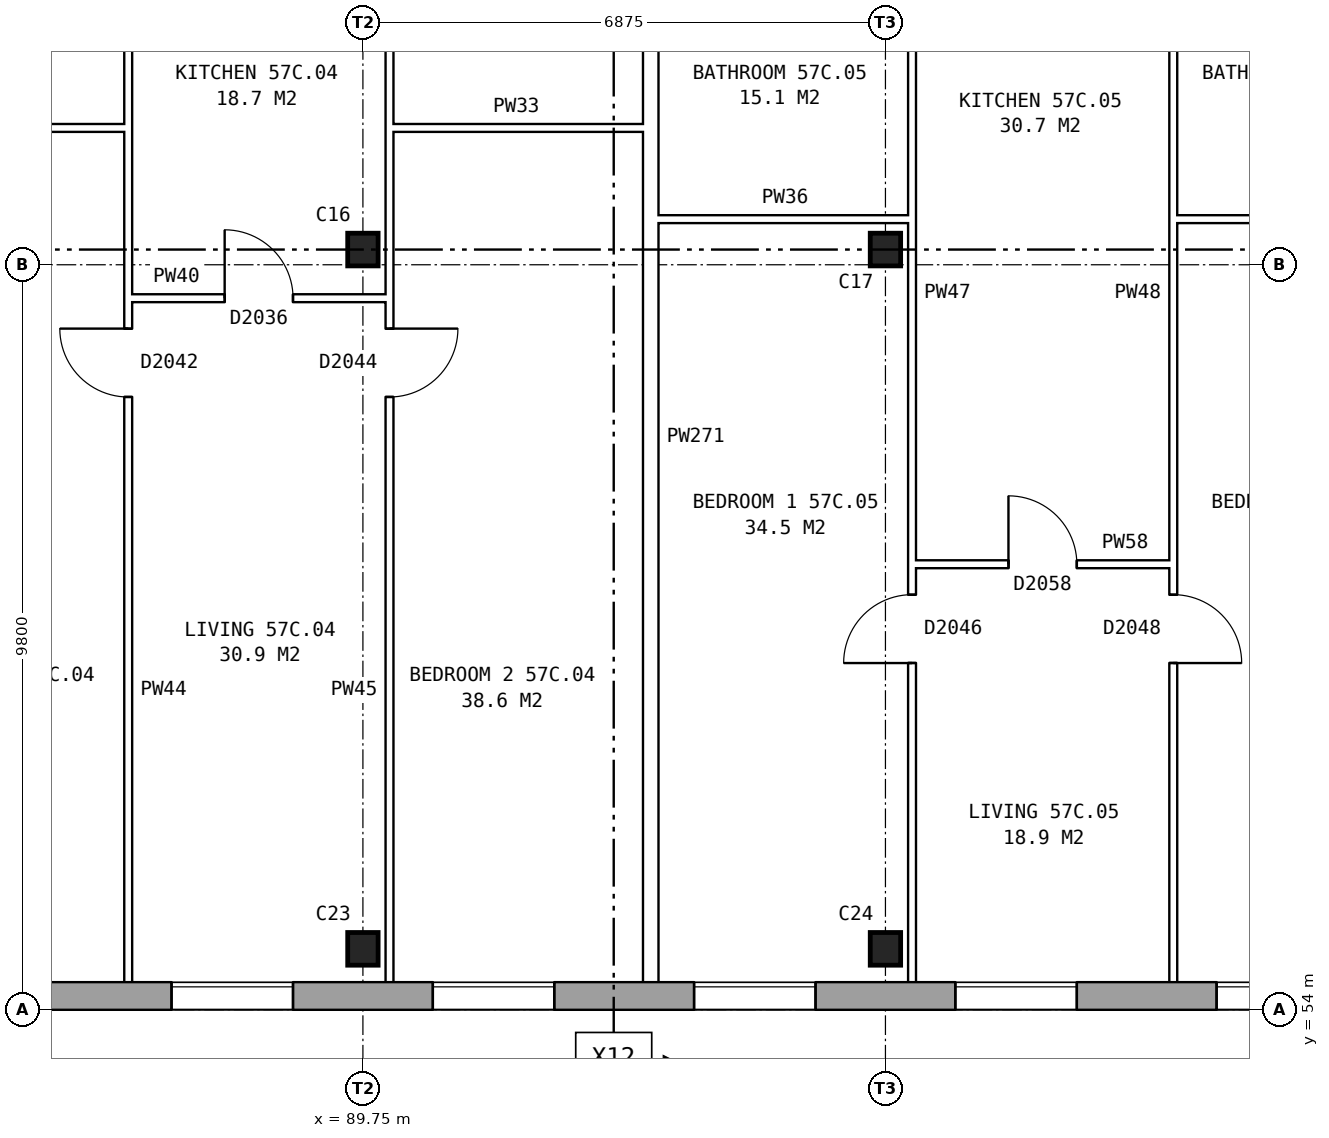
"""IFC4 building model, lengths in metres.
Left out: names, types, materials, properties, quantities, classifications, styles, units other than length and angle.
Written with IfcOpenShell. Run it as: python <this file> out.ifc"""

import sys

from ifc_helpers import new_model, si_unit, direction, frame, frame_2d, origin, origin_2d, place, context, subcontext, project, spatial, rectangle, i_section, extrude, element, fill, save


model = new_model("IFC4")
c1 = context("Model", 3, precision=1e-05, world=origin(), true_north=direction((0.0, 1.0)))
c2 = subcontext(c1, "Body", "Model", "MODEL_VIEW")
j1 = project(units=[si_unit("LENGTHUNIT", "METRE"), si_unit("PLANEANGLEUNIT", "RADIAN")], contexts=[c1])
p1 = place(None, origin())
s1 = spatial("IfcSite", under=j1, at=p1, CompositionType="ELEMENT")
p2 = place(p1, origin())
s2 = spatial("IfcBuilding", under=s1, at=p2, CompositionType="ELEMENT")
p3 = place(p2, frame((0.0, 0.0, 202.8)))
s3 = spatial("IfcBuildingStorey", under=s2, at=p3, CompositionType="ELEMENT", Elevation=202.8)
for number, where, z_axis, x_axis in (
    (1, (89.75, 54.8, 0.0), (0.0, 0.0, 1.0), (1.0, 0.0, 0.0)),
    (2, (96.625, 54.8, 0.0), (0.0, 0.0, 1.0), (1.0, 0.0, 0.0)),
    (3, (89.75, 64.0, 0.0), (0.0, 0.0, 1.0), (1.0, 0.0, 0.0)),
    (4, (96.625, 64.0, 0.0), (0.0, 0.0, 1.0), (1.0, 0.0, 0.0)),
):
    element("IfcColumn", number, at=place(p3, frame(where, z_axis=z_axis, x_axis=x_axis)), inside=s3, PredefinedType="COLUMN", context=c2, shape_type="SweptSolid", body=[
        extrude(i_section(OverallWidth=0.4, OverallDepth=0.43, WebThickness=0.04, FlangeThickness=0.04, at=origin_2d()), origin(), (0.0, 0.0, 1.0), 2.85),
    ])
p4 = place(p3, frame((75.95, 54.18, 0.0), z_axis=(0.0, 0.0, 1.0), x_axis=(1.0, 0.0, 0.0)))
e5 = element("IfcWall", 5, at=p4, inside=s3, PredefinedType="STANDARD", context=c2, shape_type="SweptSolid", body=[
    extrude(rectangle(XDim=55.1, YDim=0.36, at=frame_2d((27.55, 0.0))), origin(), (0.0, 0.0, 1.0), 2.85),
])
p5 = place(p4, frame((0.969, 0.0, 0.8)))
e6 = element("IfcOpeningElement", 6, at=p5, cuts=e5, PredefinedType="OPENING", context=c2, shape_type="SweptSolid", body=[
    extrude(rectangle(XDim=1.6, YDim=1.8, at=frame_2d((0.8, 0.9))), frame((0.0, 0.19, 0.0), z_axis=(0.0, -1.0, 0.0), x_axis=(1.0, 0.0, 0.0)), (0.0, 0.0, 1.0), 0.38),
])
p6 = place(p4, frame((4.406, 0.0, 0.8)))
e7 = element("IfcOpeningElement", 7, at=p6, cuts=e5, PredefinedType="OPENING", context=c2, shape_type="SweptSolid", body=[
    extrude(rectangle(XDim=1.6, YDim=1.8, at=frame_2d((0.8, 0.9))), frame((0.0, 0.19, 0.0), z_axis=(0.0, -1.0, 0.0), x_axis=(1.0, 0.0, 0.0)), (0.0, 0.0, 1.0), 0.38),
])
p7 = place(p4, frame((7.844, 0.0, 0.8)))
e8 = element("IfcOpeningElement", 8, at=p7, cuts=e5, PredefinedType="OPENING", context=c2, shape_type="SweptSolid", body=[
    extrude(rectangle(XDim=1.6, YDim=1.8, at=frame_2d((0.8, 0.9))), frame((0.0, 0.19, 0.0), z_axis=(0.0, -1.0, 0.0), x_axis=(1.0, 0.0, 0.0)), (0.0, 0.0, 1.0), 0.38),
])
p8 = place(p4, frame((11.281, 0.0, 0.8)))
e9 = element("IfcOpeningElement", 9, at=p8, cuts=e5, PredefinedType="OPENING", context=c2, shape_type="SweptSolid", body=[
    extrude(rectangle(XDim=1.6, YDim=1.8, at=frame_2d((0.8, 0.9))), frame((0.0, 0.19, 0.0), z_axis=(0.0, -1.0, 0.0), x_axis=(1.0, 0.0, 0.0)), (0.0, 0.0, 1.0), 0.38),
])
p9 = place(p4, frame((14.719, 0.0, 0.8)))
e10 = element("IfcOpeningElement", 10, at=p9, cuts=e5, PredefinedType="OPENING", context=c2, shape_type="SweptSolid", body=[
    extrude(rectangle(XDim=1.6, YDim=1.8, at=frame_2d((0.8, 0.9))), frame((0.0, 0.19, 0.0), z_axis=(0.0, -1.0, 0.0), x_axis=(1.0, 0.0, 0.0)), (0.0, 0.0, 1.0), 0.38),
])
p10 = place(p4, frame((18.156, 0.0, 0.8)))
e11 = element("IfcOpeningElement", 11, at=p10, cuts=e5, PredefinedType="OPENING", context=c2, shape_type="SweptSolid", body=[
    extrude(rectangle(XDim=1.6, YDim=1.8, at=frame_2d((0.8, 0.9))), frame((0.0, 0.19, 0.0), z_axis=(0.0, -1.0, 0.0), x_axis=(1.0, 0.0, 0.0)), (0.0, 0.0, 1.0), 0.38),
])
p11 = place(p4, frame((21.594, 0.0, 0.8)))
e12 = element("IfcOpeningElement", 12, at=p11, cuts=e5, PredefinedType="OPENING", context=c2, shape_type="SweptSolid", body=[
    extrude(rectangle(XDim=1.6, YDim=1.8, at=frame_2d((0.8, 0.9))), frame((0.0, 0.19, 0.0), z_axis=(0.0, -1.0, 0.0), x_axis=(1.0, 0.0, 0.0)), (0.0, 0.0, 1.0), 0.38),
])
p12 = place(p4, frame((25.031, 0.0, 0.8)))
e13 = element("IfcOpeningElement", 13, at=p12, cuts=e5, PredefinedType="OPENING", context=c2, shape_type="SweptSolid", body=[
    extrude(rectangle(XDim=1.6, YDim=1.8, at=frame_2d((0.8, 0.9))), frame((0.0, 0.19, 0.0), z_axis=(0.0, -1.0, 0.0), x_axis=(1.0, 0.0, 0.0)), (0.0, 0.0, 1.0), 0.38),
])
p13 = place(p4, frame((28.469, 0.0, 0.8)))
e14 = element("IfcOpeningElement", 14, at=p13, cuts=e5, PredefinedType="OPENING", context=c2, shape_type="SweptSolid", body=[
    extrude(rectangle(XDim=1.6, YDim=1.8, at=frame_2d((0.8, 0.9))), frame((0.0, 0.19, 0.0), z_axis=(0.0, -1.0, 0.0), x_axis=(1.0, 0.0, 0.0)), (0.0, 0.0, 1.0), 0.38),
])
p14 = place(p4, frame((31.906, 0.0, 0.8)))
e15 = element("IfcOpeningElement", 15, at=p14, cuts=e5, PredefinedType="OPENING", context=c2, shape_type="SweptSolid", body=[
    extrude(rectangle(XDim=1.6, YDim=1.8, at=frame_2d((0.8, 0.9))), frame((0.0, 0.19, 0.0), z_axis=(0.0, -1.0, 0.0), x_axis=(1.0, 0.0, 0.0)), (0.0, 0.0, 1.0), 0.38),
])
p15 = place(p4, frame((35.344, 0.0, 0.8)))
e16 = element("IfcOpeningElement", 16, at=p15, cuts=e5, PredefinedType="OPENING", context=c2, shape_type="SweptSolid", body=[
    extrude(rectangle(XDim=1.6, YDim=1.8, at=frame_2d((0.8, 0.9))), frame((0.0, 0.19, 0.0), z_axis=(0.0, -1.0, 0.0), x_axis=(1.0, 0.0, 0.0)), (0.0, 0.0, 1.0), 0.38),
])
p16 = place(p4, frame((38.781, 0.0, 0.8)))
e17 = element("IfcOpeningElement", 17, at=p16, cuts=e5, PredefinedType="OPENING", context=c2, shape_type="SweptSolid", body=[
    extrude(rectangle(XDim=1.6, YDim=1.8, at=frame_2d((0.8, 0.9))), frame((0.0, 0.19, 0.0), z_axis=(0.0, -1.0, 0.0), x_axis=(1.0, 0.0, 0.0)), (0.0, 0.0, 1.0), 0.38),
])
p17 = place(p4, frame((42.219, 0.0, 0.8)))
e18 = element("IfcOpeningElement", 18, at=p17, cuts=e5, PredefinedType="OPENING", context=c2, shape_type="SweptSolid", body=[
    extrude(rectangle(XDim=1.6, YDim=1.8, at=frame_2d((0.8, 0.9))), frame((0.0, 0.19, 0.0), z_axis=(0.0, -1.0, 0.0), x_axis=(1.0, 0.0, 0.0)), (0.0, 0.0, 1.0), 0.38),
])
p18 = place(p4, frame((45.656, 0.0, 0.8)))
e19 = element("IfcOpeningElement", 19, at=p18, cuts=e5, PredefinedType="OPENING", context=c2, shape_type="SweptSolid", body=[
    extrude(rectangle(XDim=1.6, YDim=1.8, at=frame_2d((0.8, 0.9))), frame((0.0, 0.19, 0.0), z_axis=(0.0, -1.0, 0.0), x_axis=(1.0, 0.0, 0.0)), (0.0, 0.0, 1.0), 0.38),
])
p19 = place(p4, frame((49.094, 0.0, 0.8)))
e20 = element("IfcOpeningElement", 20, at=p19, cuts=e5, PredefinedType="OPENING", context=c2, shape_type="SweptSolid", body=[
    extrude(rectangle(XDim=1.6, YDim=1.8, at=frame_2d((0.8, 0.9))), frame((0.0, 0.19, 0.0), z_axis=(0.0, -1.0, 0.0), x_axis=(1.0, 0.0, 0.0)), (0.0, 0.0, 1.0), 0.38),
])
p20 = place(p4, frame((52.531, 0.0, 0.8)))
e21 = element("IfcOpeningElement", 21, at=p20, cuts=e5, PredefinedType="OPENING", context=c2, shape_type="SweptSolid", body=[
    extrude(rectangle(XDim=1.6, YDim=1.8, at=frame_2d((0.8, 0.9))), frame((0.0, 0.19, 0.0), z_axis=(0.0, -1.0, 0.0), x_axis=(1.0, 0.0, 0.0)), (0.0, 0.0, 1.0), 0.38),
])
p21 = place(p3, frame((96.975, 59.86, 0.0), z_axis=(0.0, 0.0, 1.0), x_axis=(1.0, 0.0, 0.0)))
e22 = element("IfcWall", 22, at=p21, inside=s3, PredefinedType="PARTITIONING", context=c2, shape_type="SweptSolid", body=[
    extrude(rectangle(XDim=3.437, YDim=0.1, at=frame_2d((1.719, 0.0))), origin(), (0.0, 0.0, 1.0), 2.85),
])
p22 = place(p21, frame((1.269, 0.0, 0.0)))
e23 = element("IfcOpeningElement", 23, at=p22, cuts=e22, PredefinedType="OPENING", context=c2, shape_type="SweptSolid", body=[
    extrude(rectangle(XDim=0.9, YDim=2.1, at=frame_2d((0.45, 1.05))), frame((0.0, 0.06, 0.0), z_axis=(0.0, -1.0, 0.0), x_axis=(1.0, 0.0, 0.0)), (0.0, 0.0, 1.0), 0.12),
])
p23 = place(p3, frame((86.662, 63.36, 0.0), z_axis=(0.0, 0.0, 1.0), x_axis=(1.0, 0.0, 0.0)))
e24 = element("IfcWall", 24, at=p23, inside=s3, PredefinedType="PARTITIONING", context=c2, shape_type="SweptSolid", body=[
    extrude(rectangle(XDim=3.438, YDim=0.1, at=frame_2d((1.719, 0.0))), origin(), (0.0, 0.0, 1.0), 2.85),
])
p24 = place(p23, frame((1.269, 0.0, 0.0)))
e25 = element("IfcOpeningElement", 25, at=p24, cuts=e24, PredefinedType="OPENING", context=c2, shape_type="SweptSolid", body=[
    extrude(rectangle(XDim=0.9, YDim=2.1, at=frame_2d((0.45, 1.05))), frame((0.0, 0.06, 0.0), z_axis=(0.0, -1.0, 0.0), x_axis=(1.0, 0.0, 0.0)), (0.0, 0.0, 1.0), 0.12),
])
p25 = place(p3, frame((93.637, 64.4, 0.0), z_axis=(0.0, 0.0, 1.0), x_axis=(1.0, 0.0, 0.0)))
e26 = element("IfcWall", 26, at=p25, inside=s3, PredefinedType="PARTITIONING", context=c2, shape_type="SweptSolid", body=[
    extrude(rectangle(XDim=3.338, YDim=0.1, at=frame_2d((1.669, 0.0))), origin(), (0.0, 0.0, 1.0), 2.85),
])
p26 = place(p3, frame((100.412, 64.4, 0.0), z_axis=(0.0, 0.0, 1.0), x_axis=(1.0, 0.0, 0.0)))
e27 = element("IfcWall", 27, at=p26, inside=s3, PredefinedType="PARTITIONING", context=c2, shape_type="SweptSolid", body=[
    extrude(rectangle(XDim=6.875, YDim=0.1, at=frame_2d((3.438, 0.0))), origin(), (0.0, 0.0, 1.0), 2.85),
])
p27 = place(p3, frame((83.325, 65.6, 0.0), z_axis=(0.0, 0.0, 1.0), x_axis=(1.0, 0.0, 0.0)))
e28 = element("IfcWall", 28, at=p27, inside=s3, PredefinedType="PARTITIONING", context=c2, shape_type="SweptSolid", body=[
    extrude(rectangle(XDim=3.337, YDim=0.1, at=frame_2d((1.668, 0.0))), origin(), (0.0, 0.0, 1.0), 2.85),
])
p28 = place(p3, frame((90.1, 65.6, 0.0), z_axis=(0.0, 0.0, 1.0), x_axis=(1.0, 0.0, 0.0)))
e29 = element("IfcWall", 29, at=p28, inside=s3, PredefinedType="PARTITIONING", context=c2, shape_type="SweptSolid", body=[
    extrude(rectangle(XDim=3.337, YDim=0.1, at=frame_2d((1.668, 0.0))), origin(), (0.0, 0.0, 1.0), 2.85),
])
p29 = place(p3, frame((86.662, 54.36, 0.0), z_axis=(0.0, 0.0, 1.0), x_axis=(0.0, 1.0, 0.0)))
e30 = element("IfcWall", 30, at=p29, inside=s3, PredefinedType="PARTITIONING", context=c2, shape_type="SweptSolid", body=[
    extrude(rectangle(XDim=14.34, YDim=0.1, at=frame_2d((7.17, 0.0))), origin(), (0.0, 0.0, 1.0), 2.85),
])
p30 = place(p29, frame((7.7, 0.0, 0.0)))
e31 = element("IfcOpeningElement", 31, at=p30, cuts=e30, PredefinedType="OPENING", context=c2, shape_type="SweptSolid", body=[
    extrude(rectangle(XDim=0.9, YDim=2.1, at=frame_2d((0.45, 1.05))), frame((0.0, 0.06, 0.0), z_axis=(0.0, -1.0, 0.0), x_axis=(1.0, 0.0, 0.0)), (0.0, 0.0, 1.0), 0.12),
])
p31 = place(p29, frame((13.04, 0.0, 0.0)))
e32 = element("IfcOpeningElement", 32, at=p31, cuts=e30, PredefinedType="OPENING", context=c2, shape_type="SweptSolid", body=[
    extrude(rectangle(XDim=0.9, YDim=2.1, at=frame_2d((0.45, 1.05))), frame((0.0, 0.06, 0.0), z_axis=(0.0, -1.0, 0.0), x_axis=(1.0, 0.0, 0.0)), (0.0, 0.0, 1.0), 0.12),
])
p32 = place(p3, frame((90.1, 54.36, 0.0), z_axis=(0.0, 0.0, 1.0), x_axis=(0.0, 1.0, 0.0)))
e33 = element("IfcWall", 33, at=p32, inside=s3, PredefinedType="PARTITIONING", context=c2, shape_type="SweptSolid", body=[
    extrude(rectangle(XDim=14.34, YDim=0.1, at=frame_2d((7.17, 0.0))), origin(), (0.0, 0.0, 1.0), 2.85),
])
p33 = place(p32, frame((7.7, 0.0, 0.0)))
e34 = element("IfcOpeningElement", 34, at=p33, cuts=e33, PredefinedType="OPENING", context=c2, shape_type="SweptSolid", body=[
    extrude(rectangle(XDim=0.9, YDim=2.1, at=frame_2d((0.45, 1.05))), frame((0.0, 0.06, 0.0), z_axis=(0.0, -1.0, 0.0), x_axis=(1.0, 0.0, 0.0)), (0.0, 0.0, 1.0), 0.12),
])
p34 = place(p32, frame((13.04, 0.0, 0.0)))
e35 = element("IfcOpeningElement", 35, at=p34, cuts=e33, PredefinedType="OPENING", context=c2, shape_type="SweptSolid", body=[
    extrude(rectangle(XDim=0.9, YDim=2.1, at=frame_2d((0.45, 1.05))), frame((0.0, 0.06, 0.0), z_axis=(0.0, -1.0, 0.0), x_axis=(1.0, 0.0, 0.0)), (0.0, 0.0, 1.0), 0.12),
])
p35 = place(p3, frame((93.537, 54.36, 0.0), z_axis=(0.0, 0.0, 1.0), x_axis=(0.0, 1.0, 0.0)))
e36 = element("IfcWall", 36, at=p35, inside=s3, PredefinedType="PARTITIONING", context=c2, shape_type="SweptSolid", body=[
    extrude(rectangle(XDim=14.34, YDim=0.2, at=frame_2d((7.17, 0.0))), origin(), (0.0, 0.0, 1.0), 2.85),
])
p36 = place(p3, frame((96.975, 54.36, 0.0), z_axis=(0.0, 0.0, 1.0), x_axis=(0.0, 1.0, 0.0)))
e37 = element("IfcWall", 37, at=p36, inside=s3, PredefinedType="PARTITIONING", context=c2, shape_type="SweptSolid", body=[
    extrude(rectangle(XDim=14.34, YDim=0.1, at=frame_2d((7.17, 0.0))), origin(), (0.0, 0.0, 1.0), 2.85),
])
p37 = place(p36, frame((4.2, 0.0, 0.0)))
e38 = element("IfcOpeningElement", 38, at=p37, cuts=e37, PredefinedType="OPENING", context=c2, shape_type="SweptSolid", body=[
    extrude(rectangle(XDim=0.9, YDim=2.1, at=frame_2d((0.45, 1.05))), frame((0.0, 0.06, 0.0), z_axis=(0.0, -1.0, 0.0), x_axis=(1.0, 0.0, 0.0)), (0.0, 0.0, 1.0), 0.12),
])
p38 = place(p36, frame((13.04, 0.0, 0.0)))
e39 = element("IfcOpeningElement", 39, at=p38, cuts=e37, PredefinedType="OPENING", context=c2, shape_type="SweptSolid", body=[
    extrude(rectangle(XDim=0.9, YDim=2.1, at=frame_2d((0.45, 1.05))), frame((0.0, 0.06, 0.0), z_axis=(0.0, -1.0, 0.0), x_axis=(1.0, 0.0, 0.0)), (0.0, 0.0, 1.0), 0.12),
])
p39 = place(p3, frame((100.412, 54.36, 0.0), z_axis=(0.0, 0.0, 1.0), x_axis=(0.0, 1.0, 0.0)))
e40 = element("IfcWall", 40, at=p39, inside=s3, PredefinedType="PARTITIONING", context=c2, shape_type="SweptSolid", body=[
    extrude(rectangle(XDim=14.34, YDim=0.1, at=frame_2d((7.17, 0.0))), origin(), (0.0, 0.0, 1.0), 2.85),
])
p40 = place(p39, frame((4.2, 0.0, 0.0)))
e41 = element("IfcOpeningElement", 41, at=p40, cuts=e40, PredefinedType="OPENING", context=c2, shape_type="SweptSolid", body=[
    extrude(rectangle(XDim=0.9, YDim=2.1, at=frame_2d((0.45, 1.05))), frame((0.0, 0.06, 0.0), z_axis=(0.0, -1.0, 0.0), x_axis=(1.0, 0.0, 0.0)), (0.0, 0.0, 1.0), 0.12),
])
p41 = place(p39, frame((13.04, 0.0, 0.0)))
e42 = element("IfcOpeningElement", 42, at=p41, cuts=e40, PredefinedType="OPENING", context=c2, shape_type="SweptSolid", body=[
    extrude(rectangle(XDim=0.9, YDim=2.1, at=frame_2d((0.45, 1.05))), frame((0.0, 0.06, 0.0), z_axis=(0.0, -1.0, 0.0), x_axis=(1.0, 0.0, 0.0)), (0.0, 0.0, 1.0), 0.12),
])
p42 = place(p8, origin())
e43 = element("IfcWindow", 43, at=p42, inside=s3, PartitioningType="SINGLE_PANEL", PredefinedType="WINDOW", context=c2, shape_type="SweptSolid", body=[
    extrude(rectangle(XDim=1.6, YDim=1.8, at=frame_2d((0.8, 0.9))), frame((0.0, 0.15, 0.0), z_axis=(0.0, -1.0, 0.0), x_axis=(1.0, 0.0, 0.0)), (0.0, 0.0, 1.0), 0.06),
])
fill(e9, e43)
p43 = place(p9, origin())
e44 = element("IfcWindow", 44, at=p43, inside=s3, PartitioningType="SINGLE_PANEL", PredefinedType="WINDOW", context=c2, shape_type="SweptSolid", body=[
    extrude(rectangle(XDim=1.6, YDim=1.8, at=frame_2d((0.8, 0.9))), frame((0.0, 0.15, 0.0), z_axis=(0.0, -1.0, 0.0), x_axis=(1.0, 0.0, 0.0)), (0.0, 0.0, 1.0), 0.06),
])
fill(e10, e44)
p44 = place(p10, origin())
e45 = element("IfcWindow", 45, at=p44, inside=s3, PartitioningType="SINGLE_PANEL", PredefinedType="WINDOW", context=c2, shape_type="SweptSolid", body=[
    extrude(rectangle(XDim=1.6, YDim=1.8, at=frame_2d((0.8, 0.9))), frame((0.0, 0.15, 0.0), z_axis=(0.0, -1.0, 0.0), x_axis=(1.0, 0.0, 0.0)), (0.0, 0.0, 1.0), 0.06),
])
fill(e11, e45)
p45 = place(p11, origin())
e46 = element("IfcWindow", 46, at=p45, inside=s3, PartitioningType="SINGLE_PANEL", PredefinedType="WINDOW", context=c2, shape_type="SweptSolid", body=[
    extrude(rectangle(XDim=1.6, YDim=1.8, at=frame_2d((0.8, 0.9))), frame((0.0, 0.15, 0.0), z_axis=(0.0, -1.0, 0.0), x_axis=(1.0, 0.0, 0.0)), (0.0, 0.0, 1.0), 0.06),
])
fill(e12, e46)
p46 = place(p12, origin())
e47 = element("IfcWindow", 47, at=p46, inside=s3, PartitioningType="SINGLE_PANEL", PredefinedType="WINDOW", context=c2, shape_type="SweptSolid", body=[
    extrude(rectangle(XDim=1.6, YDim=1.8, at=frame_2d((0.8, 0.9))), frame((0.0, 0.15, 0.0), z_axis=(0.0, -1.0, 0.0), x_axis=(1.0, 0.0, 0.0)), (0.0, 0.0, 1.0), 0.06),
])
fill(e13, e47)
p47 = place(p30, origin())
e48 = element("IfcDoor", 48, at=p47, inside=s3, OperationType="SINGLE_SWING_RIGHT", PredefinedType="DOOR", context=c2, shape_type="SweptSolid", body=[
    extrude(rectangle(XDim=0.9, YDim=2.1, at=frame_2d((0.45, 1.05))), frame((0.0, 0.025, 0.0), z_axis=(0.0, -1.0, 0.0), x_axis=(1.0, 0.0, 0.0)), (0.0, 0.0, 1.0), 0.05),
])
fill(e31, e48)
p48 = place(p33, frame((0.9, 0.0, 0.0), z_axis=(0.0, 0.0, 1.0), x_axis=(-1.0, 0.0, 0.0)))
e49 = element("IfcDoor", 49, at=p48, inside=s3, OperationType="SINGLE_SWING_LEFT", PredefinedType="DOOR", context=c2, shape_type="SweptSolid", body=[
    extrude(rectangle(XDim=0.9, YDim=2.1, at=frame_2d((0.45, 1.05))), frame((0.0, 0.025, 0.0), z_axis=(0.0, -1.0, 0.0), x_axis=(1.0, 0.0, 0.0)), (0.0, 0.0, 1.0), 0.05),
])
fill(e34, e49)
p49 = place(p24, origin())
e50 = element("IfcDoor", 50, at=p49, inside=s3, OperationType="SINGLE_SWING_LEFT", PredefinedType="DOOR", context=c2, shape_type="SweptSolid", body=[
    extrude(rectangle(XDim=0.9, YDim=2.1, at=frame_2d((0.45, 1.05))), frame((0.0, 0.025, 0.0), z_axis=(0.0, -1.0, 0.0), x_axis=(1.0, 0.0, 0.0)), (0.0, 0.0, 1.0), 0.05),
])
fill(e25, e50)
p50 = place(p37, origin())
e51 = element("IfcDoor", 51, at=p50, inside=s3, OperationType="SINGLE_SWING_LEFT", PredefinedType="DOOR", context=c2, shape_type="SweptSolid", body=[
    extrude(rectangle(XDim=0.9, YDim=2.1, at=frame_2d((0.45, 1.05))), frame((0.0, 0.025, 0.0), z_axis=(0.0, -1.0, 0.0), x_axis=(1.0, 0.0, 0.0)), (0.0, 0.0, 1.0), 0.05),
])
fill(e38, e51)
p51 = place(p40, frame((0.9, 0.0, 0.0), z_axis=(0.0, 0.0, 1.0), x_axis=(-1.0, 0.0, 0.0)))
e52 = element("IfcDoor", 52, at=p51, inside=s3, OperationType="SINGLE_SWING_RIGHT", PredefinedType="DOOR", context=c2, shape_type="SweptSolid", body=[
    extrude(rectangle(XDim=0.9, YDim=2.1, at=frame_2d((0.45, 1.05))), frame((0.0, 0.025, 0.0), z_axis=(0.0, -1.0, 0.0), x_axis=(1.0, 0.0, 0.0)), (0.0, 0.0, 1.0), 0.05),
])
fill(e41, e52)
p52 = place(p22, origin())
e53 = element("IfcDoor", 53, at=p52, inside=s3, OperationType="SINGLE_SWING_LEFT", PredefinedType="DOOR", context=c2, shape_type="SweptSolid", body=[
    extrude(rectangle(XDim=0.9, YDim=2.1, at=frame_2d((0.45, 1.05))), frame((0.0, 0.025, 0.0), z_axis=(0.0, -1.0, 0.0), x_axis=(1.0, 0.0, 0.0)), (0.0, 0.0, 1.0), 0.05),
])
fill(e23, e53)
save(model, sys.argv[1])
